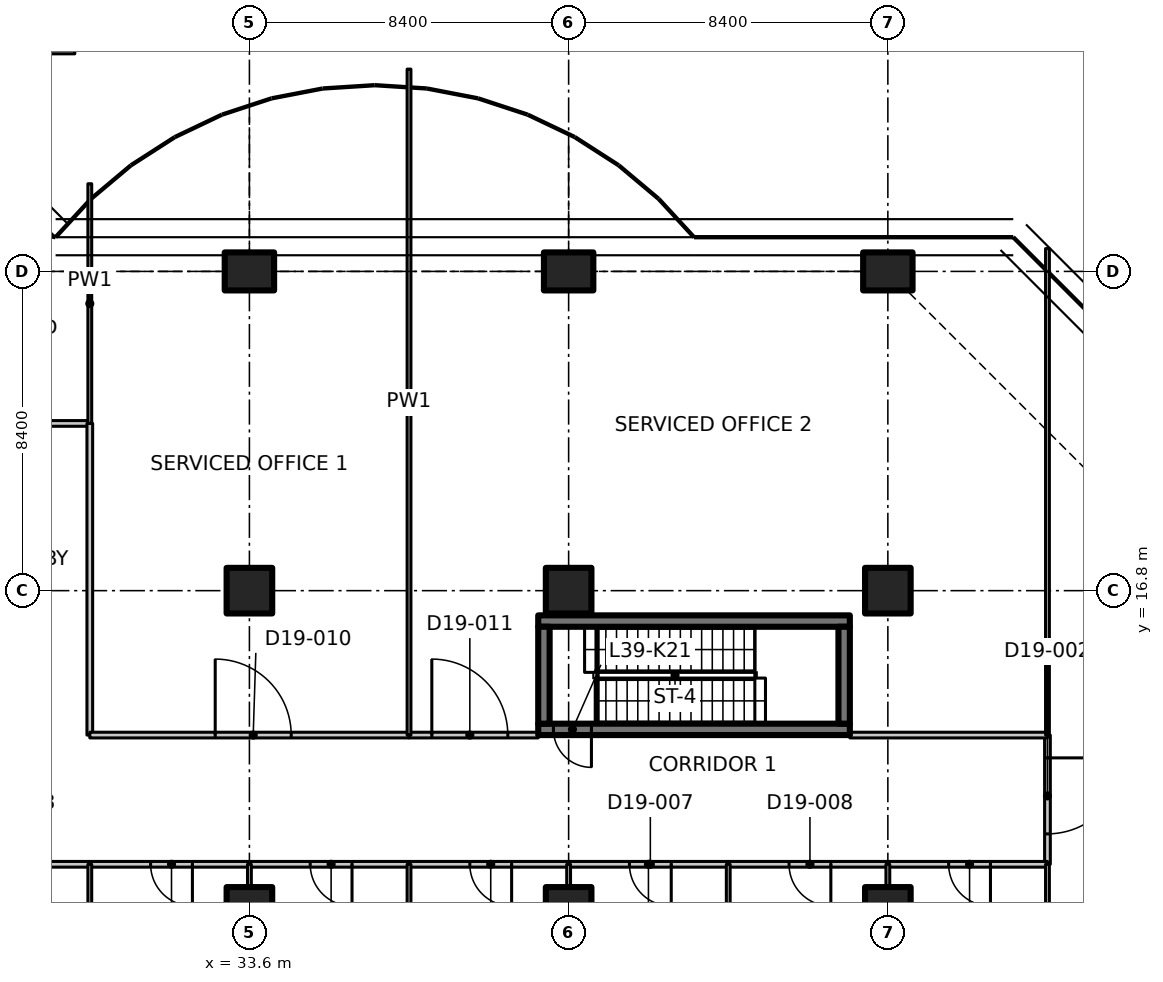
"""IFC4 building model, lengths in metres.
Left out: names, types, materials, properties, quantities, classifications, styles, units other than length and angle.
Written with IfcOpenShell. Run it as: python <this file> out.ifc"""

import sys

from ifc_helpers import new_model, si_unit, direction, frame, frame_2d, origin, origin_2d, place, context, subcontext, project, spatial, polyline, rectangle, outline, extrude, element, fill, save


model = new_model("IFC4")
c1 = context("Model", 3, precision=1e-05, world=origin(), true_north=direction((0.0, 1.0)))
c2 = subcontext(c1, "Body", "Model", "MODEL_VIEW")
j1 = project(units=[si_unit("LENGTHUNIT", "METRE"), si_unit("PLANEANGLEUNIT", "RADIAN")], contexts=[c1])
p1 = place(None, origin())
s1 = spatial("IfcSite", under=j1, at=p1, CompositionType="ELEMENT")
p2 = place(p1, origin())
s2 = spatial("IfcBuilding", under=s1, at=p2, CompositionType="ELEMENT")
p3 = place(p2, frame((0.0, 0.0, 156.5)))
s3 = spatial("IfcBuildingStorey", under=s2, at=p3, CompositionType="ELEMENT", Elevation=156.5)
for number, where, z_axis, x_axis in (
    (1, (33.6, 8.4, 0.0), (0.0, 0.0, 1.0), (1.0, 0.0, 0.0)),
    (2, (33.6, 16.8, 0.0), (0.0, 0.0, 1.0), (1.0, 0.0, 0.0)),
):
    element("IfcColumn", number, at=place(p3, frame(where, z_axis=z_axis, x_axis=x_axis)), inside=s3, PredefinedType="COLUMN", context=c2, shape_type="SweptSolid", body=[
        extrude(rectangle(XDim=1.2, YDim=1.2, at=origin_2d()), origin(), (0.0, 0.0, 1.0), 5.2),
    ])
p4 = place(p3, frame((33.6, 25.2, 0.0), z_axis=(0.0, 0.0, 1.0), x_axis=(0.0, 1.0, 0.0)))
e3 = element("IfcColumn", 3, at=p4, inside=s3, PredefinedType="COLUMN", context=c2, shape_type="SweptSolid", body=[
    extrude(rectangle(XDim=1.0, YDim=1.3, at=origin_2d()), origin(), (0.0, 0.0, 1.0), 5.2),
])
for number, where, z_axis, x_axis in (
    (4, (42.0, 8.4, 0.0), (0.0, 0.0, 1.0), (1.0, 0.0, 0.0)),
    (5, (42.0, 16.8, 0.0), (0.0, 0.0, 1.0), (1.0, 0.0, 0.0)),
):
    element("IfcColumn", number, at=place(p3, frame(where, z_axis=z_axis, x_axis=x_axis)), inside=s3, PredefinedType="COLUMN", context=c2, shape_type="SweptSolid", body=[
        extrude(rectangle(XDim=1.2, YDim=1.2, at=origin_2d()), origin(), (0.0, 0.0, 1.0), 5.2),
    ])
p5 = place(p3, frame((42.0, 25.2, 0.0), z_axis=(0.0, 0.0, 1.0), x_axis=(0.0, 1.0, 0.0)))
e6 = element("IfcColumn", 6, at=p5, inside=s3, PredefinedType="COLUMN", context=c2, shape_type="SweptSolid", body=[
    extrude(rectangle(XDim=1.0, YDim=1.3, at=origin_2d()), origin(), (0.0, 0.0, 1.0), 5.2),
])
for number, where, z_axis, x_axis in (
    (7, (50.4, 8.4, 0.0), (0.0, 0.0, 1.0), (1.0, 0.0, 0.0)),
    (8, (50.4, 16.8, 0.0), (0.0, 0.0, 1.0), (1.0, 0.0, 0.0)),
):
    element("IfcColumn", number, at=place(p3, frame(where, z_axis=z_axis, x_axis=x_axis)), inside=s3, PredefinedType="COLUMN", context=c2, shape_type="SweptSolid", body=[
        extrude(rectangle(XDim=1.2, YDim=1.2, at=origin_2d()), origin(), (0.0, 0.0, 1.0), 5.2),
    ])
p6 = place(p3, frame((50.4, 25.2, 0.0), z_axis=(0.0, 0.0, 1.0), x_axis=(0.0, 1.0, 0.0)))
e9 = element("IfcColumn", 9, at=p6, inside=s3, PredefinedType="COLUMN", context=c2, shape_type="SweptSolid", body=[
    extrude(rectangle(XDim=1.0, YDim=1.3, at=origin_2d()), origin(), (0.0, 0.0, 1.0), 5.2),
])
p7 = place(p3, frame((49.4, 13.15, 0.0), z_axis=(0.0, 0.0, 1.0), x_axis=(-1.0, 0.0, 0.0)))
e10 = element("IfcWall", 10, at=p7, inside=s3, PredefinedType="SHEAR", context=c2, shape_type="SweptSolid", body=[
    extrude(rectangle(XDim=8.2, YDim=0.3, at=frame_2d((4.1, 0.0))), origin(), (0.0, 0.0, 1.0), 5.2),
])
p8 = place(p7, frame((6.8, 0.0, 0.0)))
e11 = element("IfcOpeningElement", 11, at=p8, cuts=e10, PredefinedType="OPENING", context=c2, shape_type="SweptSolid", body=[
    extrude(rectangle(XDim=1.0, YDim=2.1, at=frame_2d((0.5, 1.05))), frame((0.0, 0.16, 0.0), z_axis=(0.0, -1.0, 0.0), x_axis=(1.0, 0.0, 0.0)), (0.0, 0.0, 1.0), 0.32),
])
p9 = place(p3, frame((41.2, 16.0, 0.0), z_axis=(0.0, 0.0, 1.0), x_axis=(1.0, 0.0, 0.0)))
e12 = element("IfcWall", 12, at=p9, inside=s3, PredefinedType="SHEAR", context=c2, shape_type="SweptSolid", body=[
    extrude(rectangle(XDim=8.2, YDim=0.3, at=frame_2d((4.1, 0.0))), origin(), (0.0, 0.0, 1.0), 5.2),
])
for number, where, z_axis, x_axis in (
    (13, (41.35, 13.3, 0.0), (0.0, 0.0, 1.0), (0.0, 1.0, 0.0)),
    (14, (49.25, 13.3, 0.0), (0.0, 0.0, 1.0), (0.0, 1.0, 0.0)),
):
    element("IfcWall", number, at=place(p3, frame(where, z_axis=z_axis, x_axis=x_axis)), inside=s3, PredefinedType="SHEAR", context=c2, shape_type="SweptSolid", body=[
        extrude(rectangle(XDim=2.55, YDim=0.3, at=frame_2d((1.275, 0.0))), origin(), (0.0, 0.0, 1.0), 5.2),
    ])
p10 = place(p3, frame((25.2, 21.2, 0.0), z_axis=(0.0, 0.0, 1.0), x_axis=(1.0, 0.0, 0.0)))
e15 = element("IfcWall", 15, at=p10, inside=s3, PredefinedType="PARTITIONING", context=c2, shape_type="SweptSolid", body=[
    extrude(rectangle(XDim=4.2, YDim=0.15, at=frame_2d((2.1, 0.0))), origin(), (0.0, 0.0, 1.0), 5.18),
])
p11 = place(p3, frame((29.4, 9.6, 0.0), z_axis=(0.0, 0.0, 1.0), x_axis=(-1.0, 0.0, 0.0)))
e16 = element("IfcWall", 16, at=p11, inside=s3, PredefinedType="PARTITIONING", context=c2, shape_type="SweptSolid", body=[
    extrude(rectangle(XDim=4.2, YDim=0.15, at=frame_2d((2.1, 0.0))), origin(), (0.0, 0.0, 1.0), 5.18),
])
p12 = place(p11, frame((1.5, 0.0, 0.0)))
e17 = element("IfcOpeningElement", 17, at=p12, cuts=e16, PredefinedType="OPENING", context=c2, shape_type="SweptSolid", body=[
    extrude(rectangle(XDim=1.1, YDim=2.1, at=frame_2d((0.55, 1.05))), frame((0.0, 0.085, 0.0), z_axis=(0.0, -1.0, 0.0), x_axis=(1.0, 0.0, 0.0)), (0.0, 0.0, 1.0), 0.17),
])
p13 = place(p3, frame((29.4, 21.2, 0.0), z_axis=(0.0, 0.0, 1.0), x_axis=(0.0, -1.0, 0.0)))
e18 = element("IfcWall", 18, at=p13, inside=s3, PredefinedType="PARTITIONING", context=c2, shape_type="SweptSolid", body=[
    extrude(rectangle(XDim=8.2, YDim=0.15, at=frame_2d((4.1, 0.0))), origin(), (0.0, 0.0, 1.0), 5.18),
])
p14 = place(p3, frame((29.4, 27.507, 0.0), z_axis=(0.0, 0.0, 1.0), x_axis=(0.0, -1.0, 0.0)))
e19 = element("IfcWall", 19, at=p14, inside=s3, PredefinedType="PARTITIONING", context=c2, shape_type="SweptSolid", body=[
    extrude(outline(polyline([(0.0, 0.0), (6.307, 0.0), (6.307, 5.18), (2.757, 5.18), (2.755, 4.83), (1.859, 4.83), (1.857, 5.18), (0.232, 5.18), (0.0, 5.18), (0.0, 0.0)])), frame((0.0, 0.05, 0.0), z_axis=(0.0, -1.0, 0.0), x_axis=(1.0, 0.0, 0.0)), (0.0, 0.0, 1.0), 0.1),
])
p15 = place(p3, frame((25.2, 31.0, 0.0), z_axis=(0.0, 0.0, 1.0), x_axis=(1.0, 0.0, 0.0)))
e20 = element("IfcWall", 20, at=p15, inside=s3, PredefinedType="PARTITIONING", context=c2, shape_type="SweptSolid", body=[
    extrude(rectangle(XDim=3.805, YDim=0.15, at=frame_2d((1.902, 0.0))), origin(), (0.0, 0.0, 1.0), 4.83),
])
p16 = place(p3, frame((54.6, 13.0, 0.0), z_axis=(0.0, 0.0, 1.0), x_axis=(0.0, -1.0, 0.0)))
e21 = element("IfcWall", 21, at=p16, inside=s3, PredefinedType="PARTITIONING", context=c2, shape_type="SweptSolid", body=[
    extrude(rectangle(XDim=3.4, YDim=0.15, at=frame_2d((1.7, 0.0))), origin(), (0.0, 0.0, 1.0), 5.18),
])
p17 = place(p16, frame((0.6, 0.0, 0.0)))
e22 = element("IfcOpeningElement", 22, at=p17, cuts=e21, PredefinedType="OPENING", context=c2, shape_type="SweptSolid", body=[
    extrude(rectangle(XDim=2.0, YDim=2.4, at=frame_2d((1.0, 1.2))), frame((0.0, 0.085, 0.0), z_axis=(0.0, -1.0, 0.0), x_axis=(1.0, 0.0, 0.0)), (0.0, 0.0, 1.0), 0.17),
])
p18 = place(p3, frame((33.6, 9.6, 0.0), z_axis=(0.0, 0.0, 1.0), x_axis=(-1.0, 0.0, 0.0)))
e23 = element("IfcWall", 23, at=p18, inside=s3, PredefinedType="PARTITIONING", context=c2, shape_type="SweptSolid", body=[
    extrude(rectangle(XDim=4.2, YDim=0.15, at=frame_2d((2.1, 0.0))), origin(), (0.0, 0.0, 1.0), 5.18),
])
p19 = place(p18, frame((1.5, 0.0, 0.0)))
e24 = element("IfcOpeningElement", 24, at=p19, cuts=e23, PredefinedType="OPENING", context=c2, shape_type="SweptSolid", body=[
    extrude(rectangle(XDim=1.1, YDim=2.1, at=frame_2d((0.55, 1.05))), frame((0.0, 0.085, 0.0), z_axis=(0.0, -1.0, 0.0), x_axis=(1.0, 0.0, 0.0)), (0.0, 0.0, 1.0), 0.17),
])
p20 = place(p3, frame((37.8, 9.6, 0.0), z_axis=(0.0, 0.0, 1.0), x_axis=(-1.0, 0.0, 0.0)))
e25 = element("IfcWall", 25, at=p20, inside=s3, PredefinedType="PARTITIONING", context=c2, shape_type="SweptSolid", body=[
    extrude(rectangle(XDim=4.2, YDim=0.15, at=frame_2d((2.1, 0.0))), origin(), (0.0, 0.0, 1.0), 5.18),
])
p21 = place(p20, frame((1.5, 0.0, 0.0)))
e26 = element("IfcOpeningElement", 26, at=p21, cuts=e25, PredefinedType="OPENING", context=c2, shape_type="SweptSolid", body=[
    extrude(rectangle(XDim=1.1, YDim=2.1, at=frame_2d((0.55, 1.05))), frame((0.0, 0.085, 0.0), z_axis=(0.0, -1.0, 0.0), x_axis=(1.0, 0.0, 0.0)), (0.0, 0.0, 1.0), 0.17),
])
p22 = place(p3, frame((42.0, 9.6, 0.0), z_axis=(0.0, 0.0, 1.0), x_axis=(-1.0, 0.0, 0.0)))
e27 = element("IfcWall", 27, at=p22, inside=s3, PredefinedType="PARTITIONING", context=c2, shape_type="SweptSolid", body=[
    extrude(rectangle(XDim=4.2, YDim=0.15, at=frame_2d((2.1, 0.0))), origin(), (0.0, 0.0, 1.0), 5.18),
])
p23 = place(p22, frame((1.5, 0.0, 0.0)))
e28 = element("IfcOpeningElement", 28, at=p23, cuts=e27, PredefinedType="OPENING", context=c2, shape_type="SweptSolid", body=[
    extrude(rectangle(XDim=1.1, YDim=2.1, at=frame_2d((0.55, 1.05))), frame((0.0, 0.085, 0.0), z_axis=(0.0, -1.0, 0.0), x_axis=(1.0, 0.0, 0.0)), (0.0, 0.0, 1.0), 0.17),
])
p24 = place(p3, frame((46.2, 9.6, 0.0), z_axis=(0.0, 0.0, 1.0), x_axis=(-1.0, 0.0, 0.0)))
e29 = element("IfcWall", 29, at=p24, inside=s3, PredefinedType="PARTITIONING", context=c2, shape_type="SweptSolid", body=[
    extrude(rectangle(XDim=4.2, YDim=0.15, at=frame_2d((2.1, 0.0))), origin(), (0.0, 0.0, 1.0), 5.18),
])
p25 = place(p24, frame((1.5, 0.0, 0.0)))
e30 = element("IfcOpeningElement", 30, at=p25, cuts=e29, PredefinedType="OPENING", context=c2, shape_type="SweptSolid", body=[
    extrude(rectangle(XDim=1.1, YDim=2.1, at=frame_2d((0.55, 1.05))), frame((0.0, 0.085, 0.0), z_axis=(0.0, -1.0, 0.0), x_axis=(1.0, 0.0, 0.0)), (0.0, 0.0, 1.0), 0.17),
])
p26 = place(p3, frame((50.4, 9.6, 0.0), z_axis=(0.0, 0.0, 1.0), x_axis=(-1.0, 0.0, 0.0)))
e31 = element("IfcWall", 31, at=p26, inside=s3, PredefinedType="PARTITIONING", context=c2, shape_type="SweptSolid", body=[
    extrude(rectangle(XDim=4.2, YDim=0.15, at=frame_2d((2.1, 0.0))), origin(), (0.0, 0.0, 1.0), 5.18),
])
p27 = place(p26, frame((1.5, 0.0, 0.0)))
e32 = element("IfcOpeningElement", 32, at=p27, cuts=e31, PredefinedType="OPENING", context=c2, shape_type="SweptSolid", body=[
    extrude(rectangle(XDim=1.1, YDim=2.1, at=frame_2d((0.55, 1.05))), frame((0.0, 0.085, 0.0), z_axis=(0.0, -1.0, 0.0), x_axis=(1.0, 0.0, 0.0)), (0.0, 0.0, 1.0), 0.17),
])
p28 = place(p3, frame((54.6, 9.6, 0.0), z_axis=(0.0, 0.0, 1.0), x_axis=(-1.0, 0.0, 0.0)))
e33 = element("IfcWall", 33, at=p28, inside=s3, PredefinedType="PARTITIONING", context=c2, shape_type="SweptSolid", body=[
    extrude(rectangle(XDim=4.2, YDim=0.15, at=frame_2d((2.1, 0.0))), origin(), (0.0, 0.0, 1.0), 5.18),
])
p29 = place(p28, frame((1.5, 0.0, 0.0)))
e34 = element("IfcOpeningElement", 34, at=p29, cuts=e33, PredefinedType="OPENING", context=c2, shape_type="SweptSolid", body=[
    extrude(rectangle(XDim=1.1, YDim=2.1, at=frame_2d((0.55, 1.05))), frame((0.0, 0.085, 0.0), z_axis=(0.0, -1.0, 0.0), x_axis=(1.0, 0.0, 0.0)), (0.0, 0.0, 1.0), 0.17),
])
p30 = place(p3, frame((29.4, 13.0, 0.0), z_axis=(0.0, 0.0, 1.0), x_axis=(1.0, 0.0, 0.0)))
e35 = element("IfcWall", 35, at=p30, inside=s3, PredefinedType="PARTITIONING", context=c2, shape_type="SweptSolid", body=[
    extrude(rectangle(XDim=8.4, YDim=0.15, at=frame_2d((4.2, 0.0))), origin(), (0.0, 0.0, 1.0), 5.18),
])
p31 = place(p30, frame((3.3, 0.0, 0.0)))
e36 = element("IfcOpeningElement", 36, at=p31, cuts=e35, PredefinedType="OPENING", context=c2, shape_type="SweptSolid", body=[
    extrude(rectangle(XDim=2.0, YDim=2.4, at=frame_2d((1.0, 1.2))), frame((0.0, 0.085, 0.0), z_axis=(0.0, -1.0, 0.0), x_axis=(1.0, 0.0, 0.0)), (0.0, 0.0, 1.0), 0.17),
])
p32 = place(p3, frame((37.8, 13.0, 0.0), z_axis=(0.0, 0.0, 1.0), x_axis=(1.0, 0.0, 0.0)))
e37 = element("IfcWall", 37, at=p32, inside=s3, PredefinedType="PARTITIONING", context=c2, shape_type="SweptSolid", body=[
    extrude(rectangle(XDim=3.4, YDim=0.15, at=frame_2d((1.7, 0.0))), origin(), (0.0, 0.0, 1.0), 5.18),
])
p33 = place(p32, frame((0.6, 0.0, 0.0)))
e38 = element("IfcOpeningElement", 38, at=p33, cuts=e37, PredefinedType="OPENING", context=c2, shape_type="SweptSolid", body=[
    extrude(rectangle(XDim=2.0, YDim=2.4, at=frame_2d((1.0, 1.2))), frame((0.0, 0.085, 0.0), z_axis=(0.0, -1.0, 0.0), x_axis=(1.0, 0.0, 0.0)), (0.0, 0.0, 1.0), 0.17),
])
p34 = place(p3, frame((49.4, 13.0, 0.0), z_axis=(0.0, 0.0, 1.0), x_axis=(1.0, 0.0, 0.0)))
e39 = element("IfcWall", 39, at=p34, inside=s3, PredefinedType="PARTITIONING", context=c2, shape_type="SweptSolid", body=[
    extrude(rectangle(XDim=5.2, YDim=0.15, at=frame_2d((2.6, 0.0))), origin(), (0.0, 0.0, 1.0), 5.18),
])
p35 = place(p3, frame((54.6, -0.2, 0.0), z_axis=(0.0, 0.0, 1.0), x_axis=(0.0, 1.0, 0.0)))
e40 = element("IfcWall", 40, at=p35, inside=s3, PredefinedType="PARTITIONING", context=c2, shape_type="SweptSolid", body=[
    extrude(outline(polyline([(0.0, 0.0), (9.8, 0.0), (9.8, 5.18), (5.066, 5.18), (5.064, 4.83), (3.736, 4.83), (3.734, 5.18), (0.0, 5.18), (0.0, 0.0)])), frame((0.0, 0.05, 0.0), z_axis=(0.0, -1.0, 0.0), x_axis=(1.0, 0.0, 0.0)), (0.0, 0.0, 1.0), 0.1),
])
p36 = place(p3, frame((54.6, 13.0, 0.0), z_axis=(0.0, 0.0, 1.0), x_axis=(0.0, 1.0, 0.0)))
e41 = element("IfcWall", 41, at=p36, inside=s3, PredefinedType="PARTITIONING", context=c2, shape_type="SweptSolid", body=[
    extrude(outline(polyline([(0.0, 0.0), (12.801, 0.0), (12.801, 5.18), (12.4, 5.18), (8.666, 5.18), (8.664, 4.83), (7.336, 4.83), (7.334, 5.18), (0.0, 5.18), (0.0, 0.0)])), frame((0.0, 0.05, 0.0), z_axis=(0.0, -1.0, 0.0), x_axis=(1.0, 0.0, 0.0)), (0.0, 0.0, 1.0), 0.1),
])
p37 = place(p3, frame((29.4, 9.6, 0.0), z_axis=(0.0, 0.0, 1.0), x_axis=(0.0, -1.0, 0.0)))
e42 = element("IfcWall", 42, at=p37, inside=s3, PredefinedType="PARTITIONING", context=c2, shape_type="SweptSolid", body=[
    extrude(outline(polyline([(0.0, 0.0), (10.779, 0.0), (10.779, 5.18), (10.7, 5.18), (10.05, 5.18), (10.048, 4.83), (9.152, 4.83), (9.15, 5.18), (0.0, 5.18), (0.0, 0.0)])), frame((0.0, 0.05, 0.0), z_axis=(0.0, -1.0, 0.0), x_axis=(1.0, 0.0, 0.0)), (0.0, 0.0, 1.0), 0.1),
])
p38 = place(p3, frame((33.6, 9.6, 0.0), z_axis=(0.0, 0.0, 1.0), x_axis=(0.0, -1.0, 0.0)))
e43 = element("IfcWall", 43, at=p38, inside=s3, PredefinedType="PARTITIONING", context=c2, shape_type="SweptSolid", body=[
    extrude(rectangle(XDim=0.58, YDim=0.1, at=frame_2d((0.29, 0.0))), origin(), (0.0, 0.0, 1.0), 5.18),
])
p39 = place(p3, frame((37.8, 9.6, 0.0), z_axis=(0.0, 0.0, 1.0), x_axis=(0.0, -1.0, 0.0)))
e44 = element("IfcWall", 44, at=p39, inside=s3, PredefinedType="PARTITIONING", context=c2, shape_type="SweptSolid", body=[
    extrude(outline(polyline([(0.0, 0.0), (10.779, 0.0), (10.779, 5.18), (10.7, 5.18), (10.05, 5.18), (10.048, 4.83), (9.152, 4.83), (9.15, 5.18), (0.0, 5.18), (0.0, 0.0)])), frame((0.0, 0.05, 0.0), z_axis=(0.0, -1.0, 0.0), x_axis=(1.0, 0.0, 0.0)), (0.0, 0.0, 1.0), 0.1),
])
p40 = place(p3, frame((42.0, 9.6, 0.0), z_axis=(0.0, 0.0, 1.0), x_axis=(0.0, -1.0, 0.0)))
e45 = element("IfcWall", 45, at=p40, inside=s3, PredefinedType="PARTITIONING", context=c2, shape_type="SweptSolid", body=[
    extrude(rectangle(XDim=0.58, YDim=0.1, at=frame_2d((0.29, 0.0))), origin(), (0.0, 0.0, 1.0), 5.18),
])
p41 = place(p3, frame((46.2, 9.6, 0.0), z_axis=(0.0, 0.0, 1.0), x_axis=(0.0, -1.0, 0.0)))
e46 = element("IfcWall", 46, at=p41, inside=s3, PredefinedType="PARTITIONING", context=c2, shape_type="SweptSolid", body=[
    extrude(outline(polyline([(0.0, 0.0), (10.779, 0.0), (10.779, 5.18), (10.7, 5.18), (10.05, 5.18), (10.048, 4.83), (9.152, 4.83), (9.15, 5.18), (0.0, 5.18), (0.0, 0.0)])), frame((0.0, 0.05, 0.0), z_axis=(0.0, -1.0, 0.0), x_axis=(1.0, 0.0, 0.0)), (0.0, 0.0, 1.0), 0.1),
])
p42 = place(p3, frame((50.4, 9.6, 0.0), z_axis=(0.0, 0.0, 1.0), x_axis=(0.0, -1.0, 0.0)))
e47 = element("IfcWall", 47, at=p42, inside=s3, PredefinedType="PARTITIONING", context=c2, shape_type="SweptSolid", body=[
    extrude(rectangle(XDim=0.58, YDim=0.1, at=frame_2d((0.29, 0.0))), origin(), (0.0, 0.0, 1.0), 5.18),
])
p43 = place(p3, frame((37.8, 30.523, 0.0), z_axis=(0.0, 0.0, 1.0), x_axis=(0.0, -1.0, 0.0)))
e48 = element("IfcWall", 48, at=p43, inside=s3, PredefinedType="PARTITIONING", context=c2, shape_type="SweptSolid", body=[
    extrude(outline(polyline([(0.0, 0.0), (17.523, 0.0), (17.523, 5.18), (5.773, 5.18), (5.771, 4.83), (4.875, 4.83), (4.873, 5.18), (0.28, 5.18), (0.0, 5.18), (0.0, 0.0)])), frame((0.0, 0.05, 0.0), z_axis=(0.0, -1.0, 0.0), x_axis=(1.0, 0.0, 0.0)), (0.0, 0.0, 1.0), 0.1),
])
p44 = place(p8, origin())
e49 = element("IfcDoor", 49, at=p44, inside=s3, OperationType="SINGLE_SWING_LEFT", PredefinedType="DOOR", context=c2, shape_type="SweptSolid", body=[
    extrude(rectangle(XDim=1.0, YDim=2.1, at=frame_2d((0.5, 1.05))), frame((0.0, 0.025, 0.0), z_axis=(0.0, -1.0, 0.0), x_axis=(1.0, 0.0, 0.0)), (0.0, 0.0, 1.0), 0.05),
])
fill(e11, e49)
p45 = place(p17, origin())
e50 = element("IfcDoor", 50, at=p45, inside=s3, OperationType="DOUBLE_DOOR_SINGLE_SWING", PredefinedType="DOOR", context=c2, shape_type="SweptSolid", body=[
    extrude(rectangle(XDim=2.0, YDim=2.4, at=frame_2d((1.0, 1.2))), frame((0.0, 0.025, 0.0), z_axis=(0.0, -1.0, 0.0), x_axis=(1.0, 0.0, 0.0)), (0.0, 0.0, 1.0), 0.05),
])
fill(e22, e50)
p46 = place(p19, origin())
e51 = element("IfcDoor", 51, at=p46, inside=s3, OperationType="SINGLE_SWING_LEFT", PredefinedType="DOOR", context=c2, shape_type="SweptSolid", body=[
    extrude(rectangle(XDim=1.1, YDim=2.1, at=frame_2d((0.55, 1.05))), frame((0.0, 0.025, 0.0), z_axis=(0.0, -1.0, 0.0), x_axis=(1.0, 0.0, 0.0)), (0.0, 0.0, 1.0), 0.05),
])
fill(e24, e51)
p47 = place(p21, origin())
e52 = element("IfcDoor", 52, at=p47, inside=s3, OperationType="SINGLE_SWING_LEFT", PredefinedType="DOOR", context=c2, shape_type="SweptSolid", body=[
    extrude(rectangle(XDim=1.1, YDim=2.1, at=frame_2d((0.55, 1.05))), frame((0.0, 0.025, 0.0), z_axis=(0.0, -1.0, 0.0), x_axis=(1.0, 0.0, 0.0)), (0.0, 0.0, 1.0), 0.05),
])
fill(e26, e52)
p48 = place(p23, origin())
e53 = element("IfcDoor", 53, at=p48, inside=s3, OperationType="SINGLE_SWING_LEFT", PredefinedType="DOOR", context=c2, shape_type="SweptSolid", body=[
    extrude(rectangle(XDim=1.1, YDim=2.1, at=frame_2d((0.55, 1.05))), frame((0.0, 0.025, 0.0), z_axis=(0.0, -1.0, 0.0), x_axis=(1.0, 0.0, 0.0)), (0.0, 0.0, 1.0), 0.05),
])
fill(e28, e53)
p49 = place(p25, origin())
e54 = element("IfcDoor", 54, at=p49, inside=s3, OperationType="SINGLE_SWING_LEFT", PredefinedType="DOOR", context=c2, shape_type="SweptSolid", body=[
    extrude(rectangle(XDim=1.1, YDim=2.1, at=frame_2d((0.55, 1.05))), frame((0.0, 0.025, 0.0), z_axis=(0.0, -1.0, 0.0), x_axis=(1.0, 0.0, 0.0)), (0.0, 0.0, 1.0), 0.05),
])
fill(e30, e54)
p50 = place(p27, origin())
e55 = element("IfcDoor", 55, at=p50, inside=s3, OperationType="SINGLE_SWING_LEFT", PredefinedType="DOOR", context=c2, shape_type="SweptSolid", body=[
    extrude(rectangle(XDim=1.1, YDim=2.1, at=frame_2d((0.55, 1.05))), frame((0.0, 0.025, 0.0), z_axis=(0.0, -1.0, 0.0), x_axis=(1.0, 0.0, 0.0)), (0.0, 0.0, 1.0), 0.05),
])
fill(e32, e55)
p51 = place(p29, origin())
e56 = element("IfcDoor", 56, at=p51, inside=s3, OperationType="SINGLE_SWING_LEFT", PredefinedType="DOOR", context=c2, shape_type="SweptSolid", body=[
    extrude(rectangle(XDim=1.1, YDim=2.1, at=frame_2d((0.55, 1.05))), frame((0.0, 0.025, 0.0), z_axis=(0.0, -1.0, 0.0), x_axis=(1.0, 0.0, 0.0)), (0.0, 0.0, 1.0), 0.05),
])
fill(e34, e56)
p52 = place(p31, origin())
e57 = element("IfcDoor", 57, at=p52, inside=s3, OperationType="DOUBLE_DOOR_SINGLE_SWING", PredefinedType="DOOR", context=c2, shape_type="SweptSolid", body=[
    extrude(rectangle(XDim=2.0, YDim=2.4, at=frame_2d((1.0, 1.2))), frame((0.0, 0.025, 0.0), z_axis=(0.0, -1.0, 0.0), x_axis=(1.0, 0.0, 0.0)), (0.0, 0.0, 1.0), 0.05),
])
fill(e36, e57)
p53 = place(p33, origin())
e58 = element("IfcDoor", 58, at=p53, inside=s3, OperationType="DOUBLE_DOOR_SINGLE_SWING", PredefinedType="DOOR", context=c2, shape_type="SweptSolid", body=[
    extrude(rectangle(XDim=2.0, YDim=2.4, at=frame_2d((1.0, 1.2))), frame((0.0, 0.025, 0.0), z_axis=(0.0, -1.0, 0.0), x_axis=(1.0, 0.0, 0.0)), (0.0, 0.0, 1.0), 0.05),
])
fill(e38, e58)
save(model, sys.argv[1])
